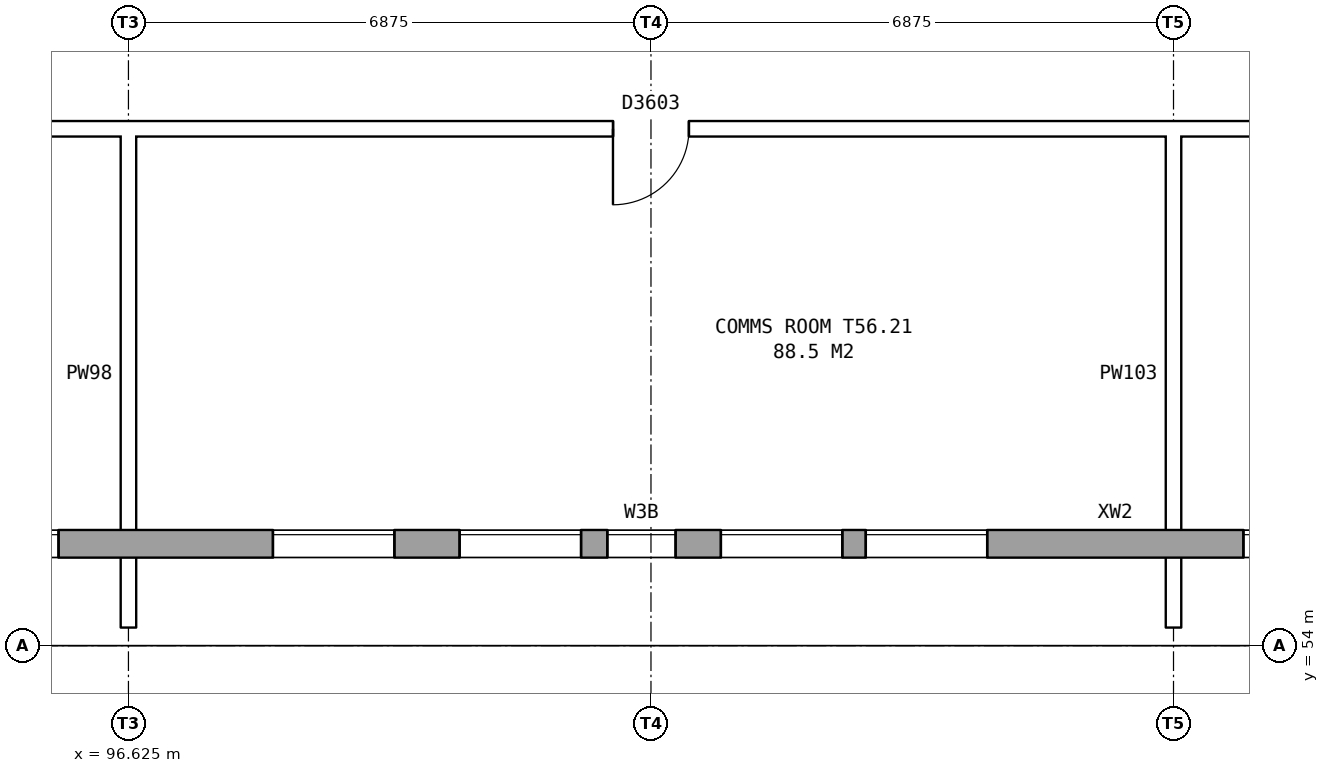
"""IFC4 building model, lengths in metres.
Left out: names, types, materials, properties, quantities, classifications, styles, units other than length and angle.
Written with IfcOpenShell. Run it as: python <this file> out.ifc"""

import sys

from ifc_helpers import new_model, si_unit, direction, frame, frame_2d, origin, place, context, subcontext, project, spatial, rectangle, extrude, element, fill, save


model = new_model("IFC4")
c1 = context("Model", 3, precision=1e-05, world=origin(), true_north=direction((0.0, 1.0)))
c2 = subcontext(c1, "Body", "Model", "MODEL_VIEW")
j1 = project(units=[si_unit("LENGTHUNIT", "METRE"), si_unit("PLANEANGLEUNIT", "RADIAN")], contexts=[c1])
p1 = place(None, origin())
s1 = spatial("IfcSite", under=j1, at=p1, CompositionType="ELEMENT")
p2 = place(p1, origin())
s2 = spatial("IfcBuilding", under=s1, at=p2, CompositionType="ELEMENT")
p3 = place(p2, frame((0.0, 0.0, 198.6)))
s3 = spatial("IfcBuildingStorey", under=s2, at=p3, CompositionType="ELEMENT", Elevation=198.6)
p4 = place(p3, frame((76.15, 55.34, 0.0), z_axis=(0.0, 0.0, 1.0), x_axis=(1.0, 0.0, 0.0)))
e1 = element("IfcWall", 1, at=p4, inside=s3, PredefinedType="STANDARD", context=c2, shape_type="SweptSolid", body=[
    extrude(rectangle(XDim=54.7, YDim=0.36, at=frame_2d((27.35, 0.0))), origin(), (0.0, 0.0, 1.0), 3.7),
])
p5 = place(p4, frame((1.75, 0.0, 1.5)))
e2 = element("IfcOpeningElement", 2, at=p5, cuts=e1, PredefinedType="OPENING", context=c2, shape_type="SweptSolid", body=[
    extrude(rectangle(XDim=0.6, YDim=1.2, at=frame_2d((0.3, 0.6))), frame((0.0, 0.19, 0.0), z_axis=(0.0, -1.0, 0.0), x_axis=(1.0, 0.0, 0.0)), (0.0, 0.0, 1.0), 0.38),
])
p6 = place(p4, frame((4.206, 0.0, 1.5)))
e3 = element("IfcOpeningElement", 3, at=p6, cuts=e1, PredefinedType="OPENING", context=c2, shape_type="SweptSolid", body=[
    extrude(rectangle(XDim=1.6, YDim=1.2, at=frame_2d((0.8, 0.6))), frame((0.0, 0.19, 0.0), z_axis=(0.0, -1.0, 0.0), x_axis=(1.0, 0.0, 0.0)), (0.0, 0.0, 1.0), 0.38),
])
p7 = place(p4, frame((8.625, 0.0, 1.5)))
e4 = element("IfcOpeningElement", 4, at=p7, cuts=e1, PredefinedType="OPENING", context=c2, shape_type="SweptSolid", body=[
    extrude(rectangle(XDim=0.6, YDim=1.2, at=frame_2d((0.3, 0.6))), frame((0.0, 0.19, 0.0), z_axis=(0.0, -1.0, 0.0), x_axis=(1.0, 0.0, 0.0)), (0.0, 0.0, 1.0), 0.38),
])
p8 = place(p4, frame((11.081, 0.0, 1.5)))
e5 = element("IfcOpeningElement", 5, at=p8, cuts=e1, PredefinedType="OPENING", context=c2, shape_type="SweptSolid", body=[
    extrude(rectangle(XDim=1.6, YDim=1.2, at=frame_2d((0.8, 0.6))), frame((0.0, 0.19, 0.0), z_axis=(0.0, -1.0, 0.0), x_axis=(1.0, 0.0, 0.0)), (0.0, 0.0, 1.0), 0.38),
])
p9 = place(p4, frame((9.525, 0.0, 1.5)))
e6 = element("IfcOpeningElement", 6, at=p9, cuts=e1, PredefinedType="OPENING", context=c2, shape_type="SweptSolid", body=[
    extrude(rectangle(XDim=1.2, YDim=1.2, at=frame_2d((0.6, 0.6))), frame((0.0, 0.19, 0.0), z_axis=(0.0, -1.0, 0.0), x_axis=(1.0, 0.0, 0.0)), (0.0, 0.0, 1.0), 0.38),
])
p10 = place(p4, frame((17.956, 0.0, 1.5)))
e7 = element("IfcOpeningElement", 7, at=p10, cuts=e1, PredefinedType="OPENING", context=c2, shape_type="SweptSolid", body=[
    extrude(rectangle(XDim=1.6, YDim=1.2, at=frame_2d((0.8, 0.6))), frame((0.0, 0.19, 0.0), z_axis=(0.0, -1.0, 0.0), x_axis=(1.0, 0.0, 0.0)), (0.0, 0.0, 1.0), 0.38),
])
p11 = place(p4, frame((22.375, 0.0, 1.5)))
e8 = element("IfcOpeningElement", 8, at=p11, cuts=e1, PredefinedType="OPENING", context=c2, shape_type="SweptSolid", body=[
    extrude(rectangle(XDim=1.6, YDim=1.2, at=frame_2d((0.8, 0.6))), frame((0.0, 0.19, 0.0), z_axis=(0.0, -1.0, 0.0), x_axis=(1.0, 0.0, 0.0)), (0.0, 0.0, 1.0), 0.38),
])
p12 = place(p4, frame((24.831, 0.0, 1.5)))
e9 = element("IfcOpeningElement", 9, at=p12, cuts=e1, PredefinedType="OPENING", context=c2, shape_type="SweptSolid", body=[
    extrude(rectangle(XDim=1.6, YDim=1.2, at=frame_2d((0.8, 0.6))), frame((0.0, 0.19, 0.0), z_axis=(0.0, -1.0, 0.0), x_axis=(1.0, 0.0, 0.0)), (0.0, 0.0, 1.0), 0.38),
])
p13 = place(p4, frame((28.269, 0.0, 1.5)))
e10 = element("IfcOpeningElement", 10, at=p13, cuts=e1, PredefinedType="OPENING", context=c2, shape_type="SweptSolid", body=[
    extrude(rectangle(XDim=1.6, YDim=1.2, at=frame_2d((0.8, 0.6))), frame((0.0, 0.19, 0.0), z_axis=(0.0, -1.0, 0.0), x_axis=(1.0, 0.0, 0.0)), (0.0, 0.0, 1.0), 0.38),
])
p14 = place(p4, frame((26.775, 0.0, 1.5)))
e11 = element("IfcOpeningElement", 11, at=p14, cuts=e1, PredefinedType="OPENING", context=c2, shape_type="SweptSolid", body=[
    extrude(rectangle(XDim=0.9, YDim=1.2, at=frame_2d((0.45, 0.6))), frame((0.0, 0.19, 0.0), z_axis=(0.0, -1.0, 0.0), x_axis=(1.0, 0.0, 0.0)), (0.0, 0.0, 1.0), 0.38),
])
p15 = place(p4, frame((35.144, 0.0, 1.5)))
e12 = element("IfcOpeningElement", 12, at=p15, cuts=e1, PredefinedType="OPENING", context=c2, shape_type="SweptSolid", body=[
    extrude(rectangle(XDim=1.6, YDim=1.2, at=frame_2d((0.8, 0.6))), frame((0.0, 0.19, 0.0), z_axis=(0.0, -1.0, 0.0), x_axis=(1.0, 0.0, 0.0)), (0.0, 0.0, 1.0), 0.38),
])
p16 = place(p4, frame((37.075, 0.0, 1.5)))
e13 = element("IfcOpeningElement", 13, at=p16, cuts=e1, PredefinedType="OPENING", context=c2, shape_type="SweptSolid", body=[
    extrude(rectangle(XDim=0.6, YDim=1.2, at=frame_2d((0.3, 0.6))), frame((0.0, 0.19, 0.0), z_axis=(0.0, -1.0, 0.0), x_axis=(1.0, 0.0, 0.0)), (0.0, 0.0, 1.0), 0.38),
])
p17 = place(p4, frame((42.019, 0.0, 1.5)))
e14 = element("IfcOpeningElement", 14, at=p17, cuts=e1, PredefinedType="OPENING", context=c2, shape_type="SweptSolid", body=[
    extrude(rectangle(XDim=1.6, YDim=1.2, at=frame_2d((0.8, 0.6))), frame((0.0, 0.19, 0.0), z_axis=(0.0, -1.0, 0.0), x_axis=(1.0, 0.0, 0.0)), (0.0, 0.0, 1.0), 0.38),
])
p18 = place(p4, frame((37.975, 0.0, 1.5)))
e15 = element("IfcOpeningElement", 15, at=p18, cuts=e1, PredefinedType="OPENING", context=c2, shape_type="SweptSolid", body=[
    extrude(rectangle(XDim=1.2, YDim=1.2, at=frame_2d((0.6, 0.6))), frame((0.0, 0.19, 0.0), z_axis=(0.0, -1.0, 0.0), x_axis=(1.0, 0.0, 0.0)), (0.0, 0.0, 1.0), 0.38),
])
p19 = place(p4, frame((48.894, 0.0, 1.5)))
e16 = element("IfcOpeningElement", 16, at=p19, cuts=e1, PredefinedType="OPENING", context=c2, shape_type="SweptSolid", body=[
    extrude(rectangle(XDim=1.6, YDim=1.2, at=frame_2d((0.8, 0.6))), frame((0.0, 0.19, 0.0), z_axis=(0.0, -1.0, 0.0), x_axis=(1.0, 0.0, 0.0)), (0.0, 0.0, 1.0), 0.38),
])
p20 = place(p4, frame((50.825, 0.0, 1.5)))
e17 = element("IfcOpeningElement", 17, at=p20, cuts=e1, PredefinedType="OPENING", context=c2, shape_type="SweptSolid", body=[
    extrude(rectangle(XDim=0.6, YDim=1.2, at=frame_2d((0.3, 0.6))), frame((0.0, 0.19, 0.0), z_axis=(0.0, -1.0, 0.0), x_axis=(1.0, 0.0, 0.0)), (0.0, 0.0, 1.0), 0.38),
])
p21 = place(p4, frame((2.65, 0.0, 1.5)))
e18 = element("IfcOpeningElement", 18, at=p21, cuts=e1, PredefinedType="OPENING", context=c2, shape_type="SweptSolid", body=[
    extrude(rectangle(XDim=1.2, YDim=1.2, at=frame_2d((0.6, 0.6))), frame((0.0, 0.19, 0.0), z_axis=(0.0, -1.0, 0.0), x_axis=(1.0, 0.0, 0.0)), (0.0, 0.0, 1.0), 0.38),
])
p22 = place(p4, frame((13.025, 0.0, 1.5)))
e19 = element("IfcOpeningElement", 19, at=p22, cuts=e1, PredefinedType="OPENING", context=c2, shape_type="SweptSolid", body=[
    extrude(rectangle(XDim=0.6, YDim=1.2, at=frame_2d((0.3, 0.6))), frame((0.0, 0.19, 0.0), z_axis=(0.0, -1.0, 0.0), x_axis=(1.0, 0.0, 0.0)), (0.0, 0.0, 1.0), 0.38),
])
p23 = place(p4, frame((15.475, 0.0, 1.5)))
e20 = element("IfcOpeningElement", 20, at=p23, cuts=e1, PredefinedType="OPENING", context=c2, shape_type="SweptSolid", body=[
    extrude(rectangle(XDim=1.6, YDim=1.2, at=frame_2d((0.8, 0.6))), frame((0.0, 0.19, 0.0), z_axis=(0.0, -1.0, 0.0), x_axis=(1.0, 0.0, 0.0)), (0.0, 0.0, 1.0), 0.38),
])
p24 = place(p4, frame((30.175, 0.0, 1.5)))
e21 = element("IfcOpeningElement", 21, at=p24, cuts=e1, PredefinedType="OPENING", context=c2, shape_type="SweptSolid", body=[
    extrude(rectangle(XDim=1.6, YDim=1.2, at=frame_2d((0.8, 0.6))), frame((0.0, 0.19, 0.0), z_axis=(0.0, -1.0, 0.0), x_axis=(1.0, 0.0, 0.0)), (0.0, 0.0, 1.0), 0.38),
])
p25 = place(p4, frame((41.075, 0.0, 1.5)))
e22 = element("IfcOpeningElement", 22, at=p25, cuts=e1, PredefinedType="OPENING", context=c2, shape_type="SweptSolid", body=[
    extrude(rectangle(XDim=0.6, YDim=1.2, at=frame_2d((0.3, 0.6))), frame((0.0, 0.19, 0.0), z_axis=(0.0, -1.0, 0.0), x_axis=(1.0, 0.0, 0.0)), (0.0, 0.0, 1.0), 0.38),
])
p26 = place(p4, frame((43.925, 0.0, 1.5)))
e23 = element("IfcOpeningElement", 23, at=p26, cuts=e1, PredefinedType="OPENING", context=c2, shape_type="SweptSolid", body=[
    extrude(rectangle(XDim=1.6, YDim=1.2, at=frame_2d((0.8, 0.6))), frame((0.0, 0.19, 0.0), z_axis=(0.0, -1.0, 0.0), x_axis=(1.0, 0.0, 0.0)), (0.0, 0.0, 1.0), 0.38),
])
p27 = place(p4, frame((51.725, 0.0, 1.5)))
e24 = element("IfcOpeningElement", 24, at=p27, cuts=e1, PredefinedType="OPENING", context=c2, shape_type="SweptSolid", body=[
    extrude(rectangle(XDim=1.2, YDim=1.2, at=frame_2d((0.6, 0.6))), frame((0.0, 0.19, 0.0), z_axis=(0.0, -1.0, 0.0), x_axis=(1.0, 0.0, 0.0)), (0.0, 0.0, 1.0), 0.38),
])
p28 = place(p3, frame((32.24, 60.8, 0.0), z_axis=(0.0, 0.0, 1.0), x_axis=(1.0, 0.0, 0.0)))
e25 = element("IfcWall", 25, at=p28, inside=s3, PredefinedType="PARTITIONING", context=c2, shape_type="SweptSolid", body=[
    extrude(rectangle(XDim=136.52, YDim=0.2, at=frame_2d((68.26, 0.0))), origin(), (0.0, 0.0, 1.0), 3.7),
])
p29 = place(p28, frame((1.94, 0.0, 0.0)))
e26 = element("IfcOpeningElement", 26, at=p29, cuts=e25, PredefinedType="OPENING", context=c2, shape_type="SweptSolid", body=[
    extrude(rectangle(XDim=1.0, YDim=2.1, at=frame_2d((0.5, 1.05))), frame((0.0, 0.11, 0.0), z_axis=(0.0, -1.0, 0.0), x_axis=(1.0, 0.0, 0.0)), (0.0, 0.0, 1.0), 0.22),
])
p30 = place(p28, frame((8.76, 0.0, 0.0)))
e27 = element("IfcOpeningElement", 27, at=p30, cuts=e25, PredefinedType="OPENING", context=c2, shape_type="SweptSolid", body=[
    extrude(rectangle(XDim=1.0, YDim=2.1, at=frame_2d((0.5, 1.05))), frame((0.0, 0.11, 0.0), z_axis=(0.0, -1.0, 0.0), x_axis=(1.0, 0.0, 0.0)), (0.0, 0.0, 1.0), 0.22),
])
p31 = place(p28, frame((20.46, 0.0, 0.0)))
e28 = element("IfcOpeningElement", 28, at=p31, cuts=e25, PredefinedType="OPENING", context=c2, shape_type="SweptSolid", body=[
    extrude(rectangle(XDim=1.0, YDim=2.1, at=frame_2d((0.5, 1.05))), frame((0.0, 0.11, 0.0), z_axis=(0.0, -1.0, 0.0), x_axis=(1.0, 0.0, 0.0)), (0.0, 0.0, 1.0), 0.22),
])
p32 = place(p28, frame((30.06, 0.0, 0.0)))
e29 = element("IfcOpeningElement", 29, at=p32, cuts=e25, PredefinedType="OPENING", context=c2, shape_type="SweptSolid", body=[
    extrude(rectangle(XDim=1.0, YDim=2.1, at=frame_2d((0.5, 1.05))), frame((0.0, 0.11, 0.0), z_axis=(0.0, -1.0, 0.0), x_axis=(1.0, 0.0, 0.0)), (0.0, 0.0, 1.0), 0.22),
])
p33 = place(p28, frame((40.08, 0.0, 0.0)))
e30 = element("IfcOpeningElement", 30, at=p33, cuts=e25, PredefinedType="OPENING", context=c2, shape_type="SweptSolid", body=[
    extrude(rectangle(XDim=1.0, YDim=2.1, at=frame_2d((0.5, 1.05))), frame((0.0, 0.11, 0.0), z_axis=(0.0, -1.0, 0.0), x_axis=(1.0, 0.0, 0.0)), (0.0, 0.0, 1.0), 0.22),
])
p34 = place(p28, frame((46.517, 0.0, 0.0)))
e31 = element("IfcOpeningElement", 31, at=p34, cuts=e25, PredefinedType="OPENING", context=c2, shape_type="SweptSolid", body=[
    extrude(rectangle(XDim=1.0, YDim=2.1, at=frame_2d((0.5, 1.05))), frame((0.0, 0.11, 0.0), z_axis=(0.0, -1.0, 0.0), x_axis=(1.0, 0.0, 0.0)), (0.0, 0.0, 1.0), 0.22),
])
p35 = place(p28, frame((57.01, 0.0, 0.0)))
e32 = element("IfcOpeningElement", 32, at=p35, cuts=e25, PredefinedType="OPENING", context=c2, shape_type="SweptSolid", body=[
    extrude(rectangle(XDim=1.0, YDim=2.1, at=frame_2d((0.5, 1.05))), frame((0.0, 0.11, 0.0), z_axis=(0.0, -1.0, 0.0), x_axis=(1.0, 0.0, 0.0)), (0.0, 0.0, 1.0), 0.22),
])
p36 = place(p28, frame((70.76, 0.0, 0.0)))
e33 = element("IfcOpeningElement", 33, at=p36, cuts=e25, PredefinedType="OPENING", context=c2, shape_type="SweptSolid", body=[
    extrude(rectangle(XDim=1.0, YDim=2.1, at=frame_2d((0.5, 1.05))), frame((0.0, 0.11, 0.0), z_axis=(0.0, -1.0, 0.0), x_axis=(1.0, 0.0, 0.0)), (0.0, 0.0, 1.0), 0.22),
])
p37 = place(p28, frame((84.51, 0.0, 0.0)))
e34 = element("IfcOpeningElement", 34, at=p37, cuts=e25, PredefinedType="OPENING", context=c2, shape_type="SweptSolid", body=[
    extrude(rectangle(XDim=1.0, YDim=2.1, at=frame_2d((0.5, 1.05))), frame((0.0, 0.11, 0.0), z_axis=(0.0, -1.0, 0.0), x_axis=(1.0, 0.0, 0.0)), (0.0, 0.0, 1.0), 0.22),
])
p38 = place(p28, frame((95.003, 0.0, 0.0)))
e35 = element("IfcOpeningElement", 35, at=p38, cuts=e25, PredefinedType="OPENING", context=c2, shape_type="SweptSolid", body=[
    extrude(rectangle(XDim=1.0, YDim=2.1, at=frame_2d((0.5, 1.05))), frame((0.0, 0.11, 0.0), z_axis=(0.0, -1.0, 0.0), x_axis=(1.0, 0.0, 0.0)), (0.0, 0.0, 1.0), 0.22),
])
p39 = place(p28, frame((101.44, 0.0, 0.0)))
e36 = element("IfcOpeningElement", 36, at=p39, cuts=e25, PredefinedType="OPENING", context=c2, shape_type="SweptSolid", body=[
    extrude(rectangle(XDim=1.0, YDim=2.1, at=frame_2d((0.5, 1.05))), frame((0.0, 0.11, 0.0), z_axis=(0.0, -1.0, 0.0), x_axis=(1.0, 0.0, 0.0)), (0.0, 0.0, 1.0), 0.22),
])
p40 = place(p28, frame((111.56, 0.0, 0.0)))
e37 = element("IfcOpeningElement", 37, at=p40, cuts=e25, PredefinedType="OPENING", context=c2, shape_type="SweptSolid", body=[
    extrude(rectangle(XDim=1.0, YDim=2.1, at=frame_2d((0.5, 1.05))), frame((0.0, 0.11, 0.0), z_axis=(0.0, -1.0, 0.0), x_axis=(1.0, 0.0, 0.0)), (0.0, 0.0, 1.0), 0.22),
])
p41 = place(p28, frame((123.56, 0.0, 0.0)))
e38 = element("IfcOpeningElement", 38, at=p41, cuts=e25, PredefinedType="OPENING", context=c2, shape_type="SweptSolid", body=[
    extrude(rectangle(XDim=1.0, YDim=2.1, at=frame_2d((0.5, 1.05))), frame((0.0, 0.11, 0.0), z_axis=(0.0, -1.0, 0.0), x_axis=(1.0, 0.0, 0.0)), (0.0, 0.0, 1.0), 0.22),
])
p42 = place(p28, frame((132.08, 0.0, 0.0)))
e39 = element("IfcOpeningElement", 39, at=p42, cuts=e25, PredefinedType="OPENING", context=c2, shape_type="SweptSolid", body=[
    extrude(rectangle(XDim=1.0, YDim=2.1, at=frame_2d((0.5, 1.05))), frame((0.0, 0.11, 0.0), z_axis=(0.0, -1.0, 0.0), x_axis=(1.0, 0.0, 0.0)), (0.0, 0.0, 1.0), 0.22),
])
for number, where, z_axis, x_axis in (
    (40, (96.625, 54.24, 0.0), (0.0, 0.0, 1.0), (0.0, 1.0, 0.0)),
    (41, (110.375, 54.24, 0.0), (0.0, 0.0, 1.0), (0.0, 1.0, 0.0)),
):
    element("IfcWall", number, at=place(p3, frame(where, z_axis=z_axis, x_axis=x_axis)), inside=s3, PredefinedType="PARTITIONING", context=c2, shape_type="SweptSolid", body=[
        extrude(rectangle(XDim=6.66, YDim=0.2, at=frame_2d((3.33, 0.0))), origin(), (0.0, 0.0, 1.0), 3.167),
    ])
p43 = place(p10, origin())
e42 = element("IfcWindow", 42, at=p43, inside=s3, PartitioningType="DOUBLE_PANEL_HORIZONTAL", PredefinedType="WINDOW", context=c2, shape_type="SweptSolid", body=[
    extrude(rectangle(XDim=1.6, YDim=1.2, at=frame_2d((0.8, 0.6))), frame((0.0, 0.15, 0.0), z_axis=(0.0, -1.0, 0.0), x_axis=(1.0, 0.0, 0.0)), (0.0, 0.0, 1.0), 0.06),
])
fill(e7, e42)
p44 = place(p11, origin())
e43 = element("IfcWindow", 43, at=p44, inside=s3, PartitioningType="DOUBLE_PANEL_HORIZONTAL", PredefinedType="WINDOW", context=c2, shape_type="SweptSolid", body=[
    extrude(rectangle(XDim=1.6, YDim=1.2, at=frame_2d((0.8, 0.6))), frame((0.0, 0.15, 0.0), z_axis=(0.0, -1.0, 0.0), x_axis=(1.0, 0.0, 0.0)), (0.0, 0.0, 1.0), 0.06),
])
fill(e8, e43)
p45 = place(p12, origin())
e44 = element("IfcWindow", 44, at=p45, inside=s3, PartitioningType="DOUBLE_PANEL_HORIZONTAL", PredefinedType="WINDOW", context=c2, shape_type="SweptSolid", body=[
    extrude(rectangle(XDim=1.6, YDim=1.2, at=frame_2d((0.8, 0.6))), frame((0.0, 0.15, 0.0), z_axis=(0.0, -1.0, 0.0), x_axis=(1.0, 0.0, 0.0)), (0.0, 0.0, 1.0), 0.06),
])
fill(e9, e44)
p46 = place(p13, origin())
e45 = element("IfcWindow", 45, at=p46, inside=s3, PartitioningType="DOUBLE_PANEL_HORIZONTAL", PredefinedType="WINDOW", context=c2, shape_type="SweptSolid", body=[
    extrude(rectangle(XDim=1.6, YDim=1.2, at=frame_2d((0.8, 0.6))), frame((0.0, 0.15, 0.0), z_axis=(0.0, -1.0, 0.0), x_axis=(1.0, 0.0, 0.0)), (0.0, 0.0, 1.0), 0.06),
])
fill(e10, e45)
p47 = place(p14, origin())
e46 = element("IfcWindow", 46, at=p47, inside=s3, PartitioningType="DOUBLE_PANEL_HORIZONTAL", PredefinedType="WINDOW", context=c2, shape_type="SweptSolid", body=[
    extrude(rectangle(XDim=0.9, YDim=1.2, at=frame_2d((0.45, 0.6))), frame((0.0, 0.15, 0.0), z_axis=(0.0, -1.0, 0.0), x_axis=(1.0, 0.0, 0.0)), (0.0, 0.0, 1.0), 0.06),
])
fill(e11, e46)
p48 = place(p15, origin())
e47 = element("IfcWindow", 47, at=p48, inside=s3, PartitioningType="DOUBLE_PANEL_HORIZONTAL", PredefinedType="WINDOW", context=c2, shape_type="SweptSolid", body=[
    extrude(rectangle(XDim=1.6, YDim=1.2, at=frame_2d((0.8, 0.6))), frame((0.0, 0.15, 0.0), z_axis=(0.0, -1.0, 0.0), x_axis=(1.0, 0.0, 0.0)), (0.0, 0.0, 1.0), 0.06),
])
fill(e12, e47)
p49 = place(p36, frame((1.0, 0.0, 0.0), z_axis=(0.0, 0.0, 1.0), x_axis=(-1.0, 0.0, 0.0)))
e48 = element("IfcDoor", 48, at=p49, inside=s3, OperationType="SINGLE_SWING_RIGHT", PredefinedType="DOOR", context=c2, shape_type="SweptSolid", body=[
    extrude(rectangle(XDim=1.0, YDim=2.1, at=frame_2d((0.5, 1.05))), frame((0.0, 0.025, 0.0), z_axis=(0.0, -1.0, 0.0), x_axis=(1.0, 0.0, 0.0)), (0.0, 0.0, 1.0), 0.05),
])
fill(e33, e48)
p50 = place(p24, origin())
e49 = element("IfcWindow", 49, at=p50, inside=s3, PartitioningType="DOUBLE_PANEL_HORIZONTAL", PredefinedType="WINDOW", context=c2, shape_type="SweptSolid", body=[
    extrude(rectangle(XDim=1.6, YDim=1.2, at=frame_2d((0.8, 0.6))), frame((0.0, 0.15, 0.0), z_axis=(0.0, -1.0, 0.0), x_axis=(1.0, 0.0, 0.0)), (0.0, 0.0, 1.0), 0.06),
])
fill(e21, e49)
save(model, sys.argv[1])
